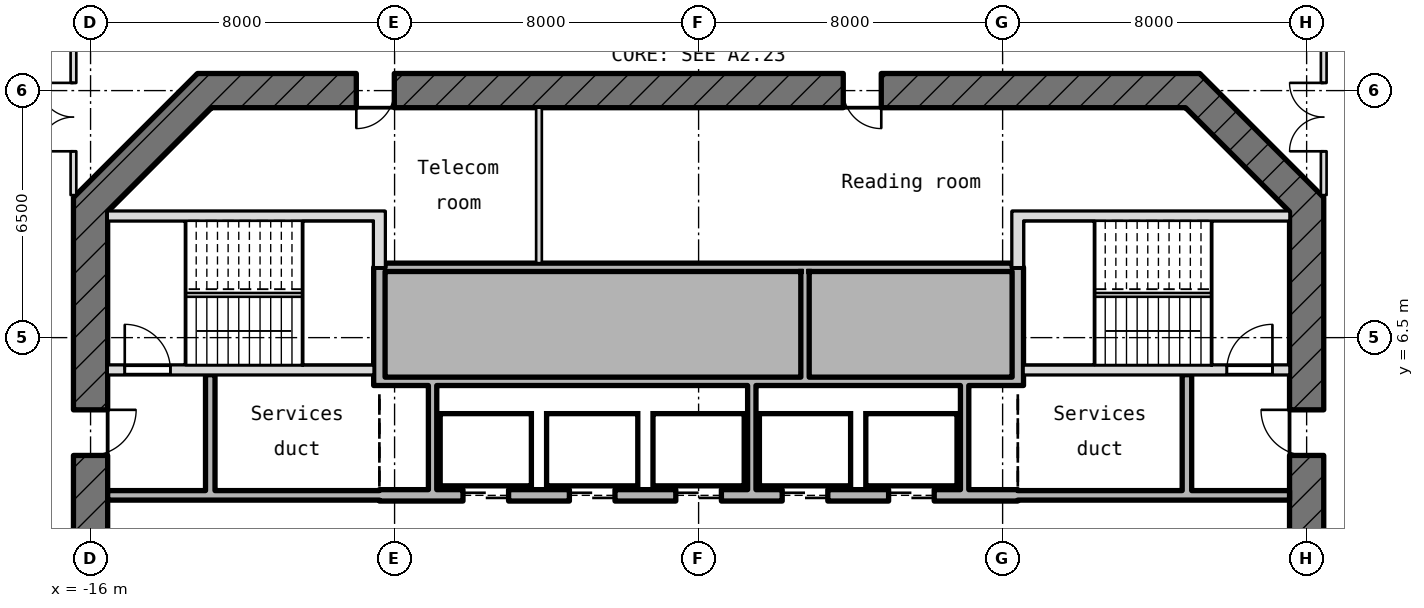
"""IFC4 building model, lengths in metres.
Left out: names, types, materials, properties, quantities, classifications, styles, units other than length and angle.
Written with IfcOpenShell. Run it as: python <this file> out.ifc"""

import sys

from ifc_helpers import new_model, si_unit, direction, frame, frame_2d, origin, place, context, subcontext, project, spatial, rectangle, extrude, element, fill, save


model = new_model("IFC4")
c1 = context("Model", 3, precision=1e-05, world=origin(), true_north=direction((0.0, 1.0)))
c2 = subcontext(c1, "Body", "Model", "MODEL_VIEW")
j1 = project(units=[si_unit("LENGTHUNIT", "METRE"), si_unit("PLANEANGLEUNIT", "RADIAN")], contexts=[c1])
p1 = place(None, origin())
s1 = spatial("IfcSite", under=j1, at=p1, CompositionType="ELEMENT")
p2 = place(p1, origin())
s2 = spatial("IfcBuilding", under=s1, at=p2, CompositionType="ELEMENT")
p3 = place(p2, frame((0.0, 0.0, 248.2)))
s3 = spatial("IfcBuildingStorey", under=s2, at=p3, CompositionType="ELEMENT", Elevation=248.2)
p4 = place(p3, frame((-14.758, 20.215, 0.0), z_axis=(0.0, 0.0, 1.0), x_axis=(-0.765697698686, -0.643200617403, 0.0)))
e1 = element("IfcWall", 1, at=p4, inside=s3, PredefinedType="SOLIDWALL", context=c2, shape_type="SweptSolid", body=[
    extrude(rectangle(XDim=10.739, YDim=0.3, at=frame_2d((5.369, 0.0))), origin(), (0.0, 0.0, 1.0), 3.97),
])
p5 = place(p4, frame((7.039, 0.0, 0.0)))
e2 = element("IfcOpeningElement", 2, at=p5, cuts=e1, PredefinedType="OPENING", context=c2, shape_type="SweptSolid", body=[
    extrude(rectangle(XDim=1.8, YDim=2.4, at=frame_2d((0.9, 1.2))), frame((0.0, 0.16, 0.0), z_axis=(0.0, -1.0, 0.0), x_axis=(1.0, 0.0, 0.0)), (0.0, 0.0, 1.0), 0.32),
])
p6 = place(p4, frame((4.438, 0.0, 0.9)))
e3 = element("IfcOpeningElement", 3, at=p6, cuts=e1, PredefinedType="OPENING", context=c2, shape_type="SweptSolid", body=[
    extrude(rectangle(XDim=2.0, YDim=1.5, at=frame_2d((1.0, 0.75))), frame((0.0, 0.16, 0.0), z_axis=(0.0, -1.0, 0.0), x_axis=(1.0, 0.0, 0.0)), (0.0, 0.0, 1.0), 0.32),
])
p7 = place(p3, frame((16.0, -10.186, -0.18), z_axis=(0.0, 0.0, 1.0), x_axis=(0.0, 1.0, 0.0)))
e4 = element("IfcWall", 4, at=p7, inside=s3, PredefinedType="SHEAR", context=c2, shape_type="SweptSolid", body=[
    extrude(rectangle(XDim=20.373, YDim=0.9, at=frame_2d((10.186, 0.0))), origin(), (0.0, 0.0, 1.0), 4.15),
])
p8 = place(p7, frame((8.986, 0.0, 0.18)))
e5 = element("IfcOpeningElement", 5, at=p8, cuts=e4, PredefinedType="OPENING", context=c2, shape_type="SweptSolid", body=[
    extrude(rectangle(XDim=2.4, YDim=2.1, at=frame_2d((1.2, 1.05))), frame((0.0, 0.46, 0.0), z_axis=(0.0, -1.0, 0.0), x_axis=(1.0, 0.0, 0.0)), (0.0, 0.0, 1.0), 0.92),
])
p9 = place(p7, frame((13.586, 0.0, 0.18)))
e6 = element("IfcOpeningElement", 6, at=p9, cuts=e4, PredefinedType="OPENING", context=c2, shape_type="SweptSolid", body=[
    extrude(rectangle(XDim=1.2, YDim=2.1, at=frame_2d((0.6, 1.05))), frame((0.0, 0.46, 0.0), z_axis=(0.0, -1.0, 0.0), x_axis=(1.0, 0.0, 0.0)), (0.0, 0.0, 1.0), 0.92),
])
p10 = place(p3, frame((16.132, 9.868, -0.18), z_axis=(0.0, 0.0, 1.0), x_axis=(-0.707106781187, 0.707106781187, 0.0)))
e7 = element("IfcWall", 7, at=p10, inside=s3, PredefinedType="SHEAR", context=c2, shape_type="SweptSolid", body=[
    extrude(rectangle(XDim=4.615, YDim=0.9, at=frame_2d((2.308, 0.0))), origin(), (0.0, 0.0, 1.0), 4.15),
])
p11 = place(p3, frame((13.186, 13.0, -0.18), z_axis=(0.0, 0.0, 1.0), x_axis=(-1.0, 0.0, 0.0)))
e8 = element("IfcWall", 8, at=p11, inside=s3, PredefinedType="SHEAR", context=c2, shape_type="SweptSolid", body=[
    extrude(rectangle(XDim=26.373, YDim=0.9, at=frame_2d((13.186, 0.0))), origin(), (0.0, 0.0, 1.0), 4.15),
])
p12 = place(p11, frame((21.193, 0.0, 0.18)))
e9 = element("IfcOpeningElement", 9, at=p12, cuts=e8, PredefinedType="OPENING", context=c2, shape_type="SweptSolid", body=[
    extrude(rectangle(XDim=1.0, YDim=2.1, at=frame_2d((0.5, 1.05))), frame((0.0, 0.46, 0.0), z_axis=(0.0, -1.0, 0.0), x_axis=(1.0, 0.0, 0.0)), (0.0, 0.0, 1.0), 0.92),
])
p13 = place(p11, frame((8.379, 0.0, 0.18)))
e10 = element("IfcOpeningElement", 10, at=p13, cuts=e8, PredefinedType="OPENING", context=c2, shape_type="SweptSolid", body=[
    extrude(rectangle(XDim=1.0, YDim=2.1, at=frame_2d((0.5, 1.05))), frame((0.0, 0.46, 0.0), z_axis=(0.0, -1.0, 0.0), x_axis=(1.0, 0.0, 0.0)), (0.0, 0.0, 1.0), 0.92),
])
p14 = place(p3, frame((-12.868, 13.132, -0.18), z_axis=(0.0, 0.0, 1.0), x_axis=(-0.707106781187, -0.707106781187, 0.0)))
e11 = element("IfcWall", 11, at=p14, inside=s3, PredefinedType="SHEAR", context=c2, shape_type="SweptSolid", body=[
    extrude(rectangle(XDim=4.615, YDim=0.9, at=frame_2d((2.308, 0.0))), origin(), (0.0, 0.0, 1.0), 4.15),
])
p15 = place(p3, frame((-16.0, 10.186, -0.18), z_axis=(0.0, 0.0, 1.0), x_axis=(0.0, -1.0, 0.0)))
e12 = element("IfcWall", 12, at=p15, inside=s3, PredefinedType="SHEAR", context=c2, shape_type="SweptSolid", body=[
    extrude(rectangle(XDim=20.373, YDim=0.9, at=frame_2d((10.186, 0.0))), origin(), (0.0, 0.0, 1.0), 4.15),
])
p16 = place(p15, frame((8.986, 0.0, 0.18)))
e13 = element("IfcOpeningElement", 13, at=p16, cuts=e12, PredefinedType="OPENING", context=c2, shape_type="SweptSolid", body=[
    extrude(rectangle(XDim=2.4, YDim=2.1, at=frame_2d((1.2, 1.05))), frame((0.0, 0.46, 0.0), z_axis=(0.0, -1.0, 0.0), x_axis=(1.0, 0.0, 0.0)), (0.0, 0.0, 1.0), 0.92),
])
p17 = place(p15, frame((5.586, 0.0, 0.18)))
e14 = element("IfcOpeningElement", 14, at=p17, cuts=e12, PredefinedType="OPENING", context=c2, shape_type="SweptSolid", body=[
    extrude(rectangle(XDim=1.2, YDim=2.1, at=frame_2d((0.6, 1.05))), frame((0.0, 0.46, 0.0), z_axis=(0.0, -1.0, 0.0), x_axis=(1.0, 0.0, 0.0)), (0.0, 0.0, 1.0), 0.92),
])
p18 = place(p3, frame((-15.55, 2.35, 0.0), z_axis=(0.0, 0.0, 1.0), x_axis=(1.0, 0.0, 0.0)))
e15 = element("IfcWall", 15, at=p18, inside=s3, PredefinedType="STANDARD", context=c2, shape_type="SweptSolid", body=[
    extrude(rectangle(XDim=7.15, YDim=0.25, at=frame_2d((3.575, 0.0))), origin(), (0.0, 0.0, 1.0), 3.97),
])
p19 = place(p3, frame((-8.4, 2.35, -0.18), z_axis=(0.0, 0.0, 1.0), x_axis=(1.0, 0.0, 0.0)))
e16 = element("IfcWall", 16, at=p19, inside=s3, PredefinedType="SHEAR", context=c2, shape_type="SweptSolid", body=[
    extrude(rectangle(XDim=16.8, YDim=0.3, at=frame_2d((8.4, 0.0))), origin(), (0.0, 0.0, 1.0), 4.15),
])
p20 = place(p19, frame((2.2, 0.0, 0.18)))
e17 = element("IfcOpeningElement", 17, at=p20, cuts=e16, PredefinedType="OPENING", context=c2, shape_type="SweptSolid", body=[
    extrude(rectangle(XDim=1.2, YDim=2.1, at=frame_2d((0.6, 1.05))), frame((0.0, 0.16, 0.0), z_axis=(0.0, -1.0, 0.0), x_axis=(1.0, 0.0, 0.0)), (0.0, 0.0, 1.0), 0.32),
])
p21 = place(p19, frame((5.0, 0.0, 0.18)))
e18 = element("IfcOpeningElement", 18, at=p21, cuts=e16, PredefinedType="OPENING", context=c2, shape_type="SweptSolid", body=[
    extrude(rectangle(XDim=1.2, YDim=2.1, at=frame_2d((0.6, 1.05))), frame((0.0, 0.16, 0.0), z_axis=(0.0, -1.0, 0.0), x_axis=(1.0, 0.0, 0.0)), (0.0, 0.0, 1.0), 0.32),
])
p22 = place(p19, frame((7.8, 0.0, 0.18)))
e19 = element("IfcOpeningElement", 19, at=p22, cuts=e16, PredefinedType="OPENING", context=c2, shape_type="SweptSolid", body=[
    extrude(rectangle(XDim=1.2, YDim=2.1, at=frame_2d((0.6, 1.05))), frame((0.0, 0.16, 0.0), z_axis=(0.0, -1.0, 0.0), x_axis=(1.0, 0.0, 0.0)), (0.0, 0.0, 1.0), 0.32),
])
p23 = place(p19, frame((10.6, 0.0, 0.18)))
e20 = element("IfcOpeningElement", 20, at=p23, cuts=e16, PredefinedType="OPENING", context=c2, shape_type="SweptSolid", body=[
    extrude(rectangle(XDim=1.2, YDim=2.1, at=frame_2d((0.6, 1.05))), frame((0.0, 0.16, 0.0), z_axis=(0.0, -1.0, 0.0), x_axis=(1.0, 0.0, 0.0)), (0.0, 0.0, 1.0), 0.32),
])
p24 = place(p19, frame((13.4, 0.0, 0.18)))
e21 = element("IfcOpeningElement", 21, at=p24, cuts=e16, PredefinedType="OPENING", context=c2, shape_type="SweptSolid", body=[
    extrude(rectangle(XDim=1.2, YDim=2.1, at=frame_2d((0.6, 1.05))), frame((0.0, 0.16, 0.0), z_axis=(0.0, -1.0, 0.0), x_axis=(1.0, 0.0, 0.0)), (0.0, 0.0, 1.0), 0.32),
])
p25 = place(p3, frame((8.4, 2.35, 0.0), z_axis=(0.0, 0.0, 1.0), x_axis=(1.0, 0.0, 0.0)))
e22 = element("IfcWall", 22, at=p25, inside=s3, PredefinedType="STANDARD", context=c2, shape_type="SweptSolid", body=[
    extrude(rectangle(XDim=7.15, YDim=0.25, at=frame_2d((3.575, 0.0))), origin(), (0.0, 0.0, 1.0), 3.97),
])
p26 = place(p3, frame((-8.25, 5.35, 0.0), z_axis=(0.0, 0.0, 1.0), x_axis=(1.0, 0.0, 0.0)))
e23 = element("IfcWall", 23, at=p26, inside=s3, PredefinedType="STANDARD", context=c2, shape_type="SweptSolid", body=[
    extrude(rectangle(XDim=16.5, YDim=0.22, at=frame_2d((8.25, 0.0))), origin(), (0.0, 0.0, 1.0), 3.97),
])
p27 = place(p3, frame((-15.55, 5.65, -0.18), z_axis=(0.0, 0.0, 1.0), x_axis=(1.0, 0.0, 0.0)))
e24 = element("IfcWall", 24, at=p27, inside=s3, PredefinedType="SHEAR", context=c2, shape_type="SweptSolid", body=[
    extrude(rectangle(XDim=7.0, YDim=0.25, at=frame_2d((3.5, 0.0))), origin(), (0.0, 0.0, 1.0), 4.15),
])
p28 = place(p27, frame((0.45, 0.0, 0.18)))
e25 = element("IfcOpeningElement", 25, at=p28, cuts=e24, PredefinedType="OPENING", context=c2, shape_type="SweptSolid", body=[
    extrude(rectangle(XDim=1.2, YDim=2.1, at=frame_2d((0.6, 1.05))), frame((0.0, 0.135, 0.0), z_axis=(0.0, -1.0, 0.0), x_axis=(1.0, 0.0, 0.0)), (0.0, 0.0, 1.0), 0.27),
])
p29 = place(p3, frame((8.55, 5.65, -0.18), z_axis=(0.0, 0.0, 1.0), x_axis=(1.0, 0.0, 0.0)))
e26 = element("IfcWall", 26, at=p29, inside=s3, PredefinedType="SHEAR", context=c2, shape_type="SweptSolid", body=[
    extrude(rectangle(XDim=7.0, YDim=0.25, at=frame_2d((3.5, 0.0))), origin(), (0.0, 0.0, 1.0), 4.15),
])
p30 = place(p29, frame((5.35, 0.0, 0.18)))
e27 = element("IfcOpeningElement", 27, at=p30, cuts=e26, PredefinedType="OPENING", context=c2, shape_type="SweptSolid", body=[
    extrude(rectangle(XDim=1.2, YDim=2.1, at=frame_2d((0.6, 1.05))), frame((0.0, 0.135, 0.0), z_axis=(0.0, -1.0, 0.0), x_axis=(1.0, 0.0, 0.0)), (0.0, 0.0, 1.0), 0.27),
])
p31 = place(p3, frame((-8.25, 8.35, 0.0), z_axis=(0.0, 0.0, 1.0), x_axis=(1.0, 0.0, 0.0)))
e28 = element("IfcWall", 28, at=p31, inside=s3, PredefinedType="STANDARD", context=c2, shape_type="SweptSolid", body=[
    extrude(rectangle(XDim=16.5, YDim=0.22, at=frame_2d((8.25, 0.0))), origin(), (0.0, 0.0, 1.0), 3.97),
])
for number, where, z_axis, x_axis in (
    (29, (-15.55, 9.7, -0.18), (0.0, 0.0, 1.0), (1.0, 0.0, 0.0)),
    (30, (8.55, 9.7, -0.18), (0.0, 0.0, 1.0), (1.0, 0.0, 0.0)),
):
    element("IfcWall", number, at=place(p3, frame(where, z_axis=z_axis, x_axis=x_axis)), inside=s3, PredefinedType="SHEAR", context=c2, shape_type="SweptSolid", body=[
        extrude(rectangle(XDim=7.0, YDim=0.25, at=frame_2d((3.5, 0.0))), origin(), (0.0, 0.0, 1.0), 4.15),
    ])
p32 = place(p3, frame((-12.85, 2.475, 0.0), z_axis=(0.0, 0.0, 1.0), x_axis=(0.0, 1.0, 0.0)))
e31 = element("IfcWall", 31, at=p32, inside=s3, PredefinedType="STANDARD", context=c2, shape_type="SweptSolid", body=[
    extrude(rectangle(XDim=3.05, YDim=0.25, at=frame_2d((1.525, 0.0))), origin(), (0.0, 0.0, 1.0), 3.97),
])
p33 = place(p3, frame((-8.4, 5.24, -0.18), z_axis=(0.0, 0.0, 1.0), x_axis=(0.0, 1.0, 0.0)))
e32 = element("IfcWall", 32, at=p33, inside=s3, PredefinedType="SHEAR", context=c2, shape_type="SweptSolid", body=[
    extrude(rectangle(XDim=3.11, YDim=0.3, at=frame_2d((1.555, 0.0))), origin(), (0.0, 0.0, 1.0), 4.15),
])
p34 = place(p3, frame((-8.4, 8.35, -0.18), z_axis=(0.0, 0.0, 1.0), x_axis=(0.0, 1.0, 0.0)))
e33 = element("IfcWall", 33, at=p34, inside=s3, PredefinedType="SHEAR", context=c2, shape_type="SweptSolid", body=[
    extrude(rectangle(XDim=1.475, YDim=0.3, at=frame_2d((0.737, 0.0))), origin(), (0.0, 0.0, 1.0), 4.15),
])
p35 = place(p3, frame((-7.0, 2.5, 0.0), z_axis=(0.0, 0.0, 1.0), x_axis=(0.0, 1.0, 0.0)))
e34 = element("IfcWall", 34, at=p35, inside=s3, PredefinedType="STANDARD", context=c2, shape_type="SweptSolid", body=[
    extrude(rectangle(XDim=2.74, YDim=0.22, at=frame_2d((1.37, 0.0))), origin(), (0.0, 0.0, 1.0), 3.97),
])
p36 = place(p3, frame((-4.2, 8.46, 0.0), z_axis=(0.0, 0.0, 1.0), x_axis=(0.0, 1.0, 0.0)))
e35 = element("IfcWall", 35, at=p36, inside=s3, PredefinedType="PARTITIONING", context=c2, shape_type="SweptSolid", body=[
    extrude(rectangle(XDim=4.09, YDim=0.15, at=frame_2d((2.045, 0.0))), origin(), (0.0, 0.0, 1.0), 3.97),
])
p37 = place(p3, frame((1.4, 2.5, 0.0), z_axis=(0.0, 0.0, 1.0), x_axis=(0.0, 1.0, 0.0)))
e36 = element("IfcWall", 36, at=p37, inside=s3, PredefinedType="STANDARD", context=c2, shape_type="SweptSolid", body=[
    extrude(rectangle(XDim=2.74, YDim=0.22, at=frame_2d((1.37, 0.0))), origin(), (0.0, 0.0, 1.0), 3.97),
])
p38 = place(p3, frame((2.8, 5.46, 0.0), z_axis=(0.0, 0.0, 1.0), x_axis=(0.0, 1.0, 0.0)))
e37 = element("IfcWall", 37, at=p38, inside=s3, PredefinedType="STANDARD", context=c2, shape_type="SweptSolid", body=[
    extrude(rectangle(XDim=2.78, YDim=0.22, at=frame_2d((1.39, 0.0))), origin(), (0.0, 0.0, 1.0), 3.97),
])
p39 = place(p3, frame((7.0, 2.5, 0.0), z_axis=(0.0, 0.0, 1.0), x_axis=(0.0, 1.0, 0.0)))
e38 = element("IfcWall", 38, at=p39, inside=s3, PredefinedType="STANDARD", context=c2, shape_type="SweptSolid", body=[
    extrude(rectangle(XDim=2.74, YDim=0.22, at=frame_2d((1.37, 0.0))), origin(), (0.0, 0.0, 1.0), 3.97),
])
p40 = place(p3, frame((8.4, 5.24, -0.18), z_axis=(0.0, 0.0, 1.0), x_axis=(0.0, 1.0, 0.0)))
e39 = element("IfcWall", 39, at=p40, inside=s3, PredefinedType="SHEAR", context=c2, shape_type="SweptSolid", body=[
    extrude(rectangle(XDim=3.11, YDim=0.3, at=frame_2d((1.555, 0.0))), origin(), (0.0, 0.0, 1.0), 4.15),
])
p41 = place(p3, frame((8.4, 8.35, -0.18), z_axis=(0.0, 0.0, 1.0), x_axis=(0.0, 1.0, 0.0)))
e40 = element("IfcWall", 40, at=p41, inside=s3, PredefinedType="SHEAR", context=c2, shape_type="SweptSolid", body=[
    extrude(rectangle(XDim=1.475, YDim=0.3, at=frame_2d((0.737, 0.0))), origin(), (0.0, 0.0, 1.0), 4.15),
])
p42 = place(p3, frame((12.85, 2.475, 0.0), z_axis=(0.0, 0.0, 1.0), x_axis=(0.0, 1.0, 0.0)))
e41 = element("IfcWall", 41, at=p42, inside=s3, PredefinedType="STANDARD", context=c2, shape_type="SweptSolid", body=[
    extrude(rectangle(XDim=3.05, YDim=0.25, at=frame_2d((1.525, 0.0))), origin(), (0.0, 0.0, 1.0), 3.97),
])
p43 = place(p3, frame((-16.45, 10.25, 0.0), z_axis=(0.0, 0.0, 1.0), x_axis=(0.0, 1.0, 0.0)))
e42 = element("IfcWall", 42, at=p43, inside=s3, PredefinedType="PARTITIONING", context=c2, shape_type="SweptSolid", body=[
    extrude(rectangle(XDim=7.017, YDim=0.15, at=frame_2d((3.509, 0.0))), origin(), (0.0, 0.0, 1.0), 3.97),
])
p44 = place(p43, frame((1.153, 0.0, 0.0)))
e43 = element("IfcOpeningElement", 43, at=p44, cuts=e42, PredefinedType="OPENING", context=c2, shape_type="SweptSolid", body=[
    extrude(rectangle(XDim=1.8, YDim=2.1, at=frame_2d((0.9, 1.05))), frame((0.0, 0.085, 0.0), z_axis=(0.0, -1.0, 0.0), x_axis=(1.0, 0.0, 0.0)), (0.0, 0.0, 1.0), 0.17),
])
p45 = place(p3, frame((16.45, 10.25, 0.0), z_axis=(0.0, 0.0, 1.0), x_axis=(0.0, 1.0, 0.0)))
e44 = element("IfcWall", 44, at=p45, inside=s3, PredefinedType="PARTITIONING", context=c2, shape_type="SweptSolid", body=[
    extrude(rectangle(XDim=7.017, YDim=0.15, at=frame_2d((3.509, 0.0))), origin(), (0.0, 0.0, 1.0), 3.97),
])
p46 = place(p45, frame((1.153, 0.0, 0.0)))
e45 = element("IfcOpeningElement", 45, at=p46, cuts=e44, PredefinedType="OPENING", context=c2, shape_type="SweptSolid", body=[
    extrude(rectangle(XDim=1.8, YDim=2.1, at=frame_2d((0.9, 1.05))), frame((0.0, 0.085, 0.0), z_axis=(0.0, -1.0, 0.0), x_axis=(1.0, 0.0, 0.0)), (0.0, 0.0, 1.0), 0.17),
])
p47 = place(p20, origin())
e46 = element("IfcDoor", 46, at=p47, inside=s3, OperationType="DOUBLE_DOOR_SLIDING", PredefinedType="DOOR", context=c2, shape_type="SweptSolid", body=[
    extrude(rectangle(XDim=1.2, YDim=2.1, at=frame_2d((0.6, 1.05))), frame((0.0, 0.025, 0.0), z_axis=(0.0, -1.0, 0.0), x_axis=(1.0, 0.0, 0.0)), (0.0, 0.0, 1.0), 0.05),
])
fill(e17, e46)
p48 = place(p21, origin())
e47 = element("IfcDoor", 47, at=p48, inside=s3, OperationType="DOUBLE_DOOR_SLIDING", PredefinedType="DOOR", context=c2, shape_type="SweptSolid", body=[
    extrude(rectangle(XDim=1.2, YDim=2.1, at=frame_2d((0.6, 1.05))), frame((0.0, 0.025, 0.0), z_axis=(0.0, -1.0, 0.0), x_axis=(1.0, 0.0, 0.0)), (0.0, 0.0, 1.0), 0.05),
])
fill(e18, e47)
p49 = place(p22, origin())
e48 = element("IfcDoor", 48, at=p49, inside=s3, OperationType="DOUBLE_DOOR_SLIDING", PredefinedType="DOOR", context=c2, shape_type="SweptSolid", body=[
    extrude(rectangle(XDim=1.2, YDim=2.1, at=frame_2d((0.6, 1.05))), frame((0.0, 0.025, 0.0), z_axis=(0.0, -1.0, 0.0), x_axis=(1.0, 0.0, 0.0)), (0.0, 0.0, 1.0), 0.05),
])
fill(e19, e48)
p50 = place(p23, origin())
e49 = element("IfcDoor", 49, at=p50, inside=s3, OperationType="DOUBLE_DOOR_SLIDING", PredefinedType="DOOR", context=c2, shape_type="SweptSolid", body=[
    extrude(rectangle(XDim=1.2, YDim=2.1, at=frame_2d((0.6, 1.05))), frame((0.0, 0.025, 0.0), z_axis=(0.0, -1.0, 0.0), x_axis=(1.0, 0.0, 0.0)), (0.0, 0.0, 1.0), 0.05),
])
fill(e20, e49)
p51 = place(p24, origin())
e50 = element("IfcDoor", 50, at=p51, inside=s3, OperationType="DOUBLE_DOOR_SLIDING", PredefinedType="DOOR", context=c2, shape_type="SweptSolid", body=[
    extrude(rectangle(XDim=1.2, YDim=2.1, at=frame_2d((0.6, 1.05))), frame((0.0, 0.025, 0.0), z_axis=(0.0, -1.0, 0.0), x_axis=(1.0, 0.0, 0.0)), (0.0, 0.0, 1.0), 0.05),
])
fill(e21, e50)
p52 = place(p28, origin())
e51 = element("IfcDoor", 51, at=p52, inside=s3, OperationType="SINGLE_SWING_RIGHT", PredefinedType="DOOR", context=c2, shape_type="SweptSolid", body=[
    extrude(rectangle(XDim=1.2, YDim=2.1, at=frame_2d((0.6, 1.05))), frame((0.0, 0.025, 0.0), z_axis=(0.0, -1.0, 0.0), x_axis=(1.0, 0.0, 0.0)), (0.0, 0.0, 1.0), 0.05),
])
fill(e25, e51)
p53 = place(p30, origin())
e52 = element("IfcDoor", 52, at=p53, inside=s3, OperationType="SINGLE_SWING_RIGHT", PredefinedType="DOOR", context=c2, shape_type="SweptSolid", body=[
    extrude(rectangle(XDim=1.2, YDim=2.1, at=frame_2d((0.6, 1.05))), frame((0.0, 0.025, 0.0), z_axis=(0.0, -1.0, 0.0), x_axis=(1.0, 0.0, 0.0)), (0.0, 0.0, 1.0), 0.05),
])
fill(e27, e52)
p54 = place(p17, origin())
e53 = element("IfcDoor", 53, at=p54, inside=s3, OperationType="SINGLE_SWING_RIGHT", PredefinedType="DOOR", context=c2, shape_type="SweptSolid", body=[
    extrude(rectangle(XDim=1.2, YDim=2.1, at=frame_2d((0.6, 1.05))), frame((0.0, 0.025, 0.0), z_axis=(0.0, -1.0, 0.0), x_axis=(1.0, 0.0, 0.0)), (0.0, 0.0, 1.0), 0.05),
])
fill(e14, e53)
p55 = place(p9, origin())
e54 = element("IfcDoor", 54, at=p55, inside=s3, OperationType="SINGLE_SWING_RIGHT", PredefinedType="DOOR", context=c2, shape_type="SweptSolid", body=[
    extrude(rectangle(XDim=1.2, YDim=2.1, at=frame_2d((0.6, 1.05))), frame((0.0, 0.025, 0.0), z_axis=(0.0, -1.0, 0.0), x_axis=(1.0, 0.0, 0.0)), (0.0, 0.0, 1.0), 0.05),
])
fill(e6, e54)
p56 = place(p12, origin())
e55 = element("IfcDoor", 55, at=p56, inside=s3, OperationType="SINGLE_SWING_RIGHT", PredefinedType="DOOR", context=c2, shape_type="SweptSolid", body=[
    extrude(rectangle(XDim=1.0, YDim=2.1, at=frame_2d((0.5, 1.05))), frame((0.0, 0.025, 0.0), z_axis=(0.0, -1.0, 0.0), x_axis=(1.0, 0.0, 0.0)), (0.0, 0.0, 1.0), 0.05),
])
fill(e9, e55)
p57 = place(p13, origin())
e56 = element("IfcDoor", 56, at=p57, inside=s3, OperationType="SINGLE_SWING_RIGHT", PredefinedType="DOOR", context=c2, shape_type="SweptSolid", body=[
    extrude(rectangle(XDim=1.0, YDim=2.1, at=frame_2d((0.5, 1.05))), frame((0.0, 0.025, 0.0), z_axis=(0.0, -1.0, 0.0), x_axis=(1.0, 0.0, 0.0)), (0.0, 0.0, 1.0), 0.05),
])
fill(e10, e56)
p58 = place(p44, origin())
e57 = element("IfcDoor", 57, at=p58, inside=s3, OperationType="DOUBLE_DOOR_SINGLE_SWING", PredefinedType="DOOR", context=c2, shape_type="SweptSolid", body=[
    extrude(rectangle(XDim=1.8, YDim=2.1, at=frame_2d((0.9, 1.05))), frame((0.0, 0.025, 0.0), z_axis=(0.0, -1.0, 0.0), x_axis=(1.0, 0.0, 0.0)), (0.0, 0.0, 1.0), 0.05),
])
fill(e43, e57)
p59 = place(p46, origin())
e58 = element("IfcDoor", 58, at=p59, inside=s3, OperationType="DOUBLE_DOOR_SINGLE_SWING", PredefinedType="DOOR", context=c2, shape_type="SweptSolid", body=[
    extrude(rectangle(XDim=1.8, YDim=2.1, at=frame_2d((0.9, 1.05))), frame((0.0, 0.025, 0.0), z_axis=(0.0, -1.0, 0.0), x_axis=(1.0, 0.0, 0.0)), (0.0, 0.0, 1.0), 0.05),
])
fill(e45, e58)
save(model, sys.argv[1])
